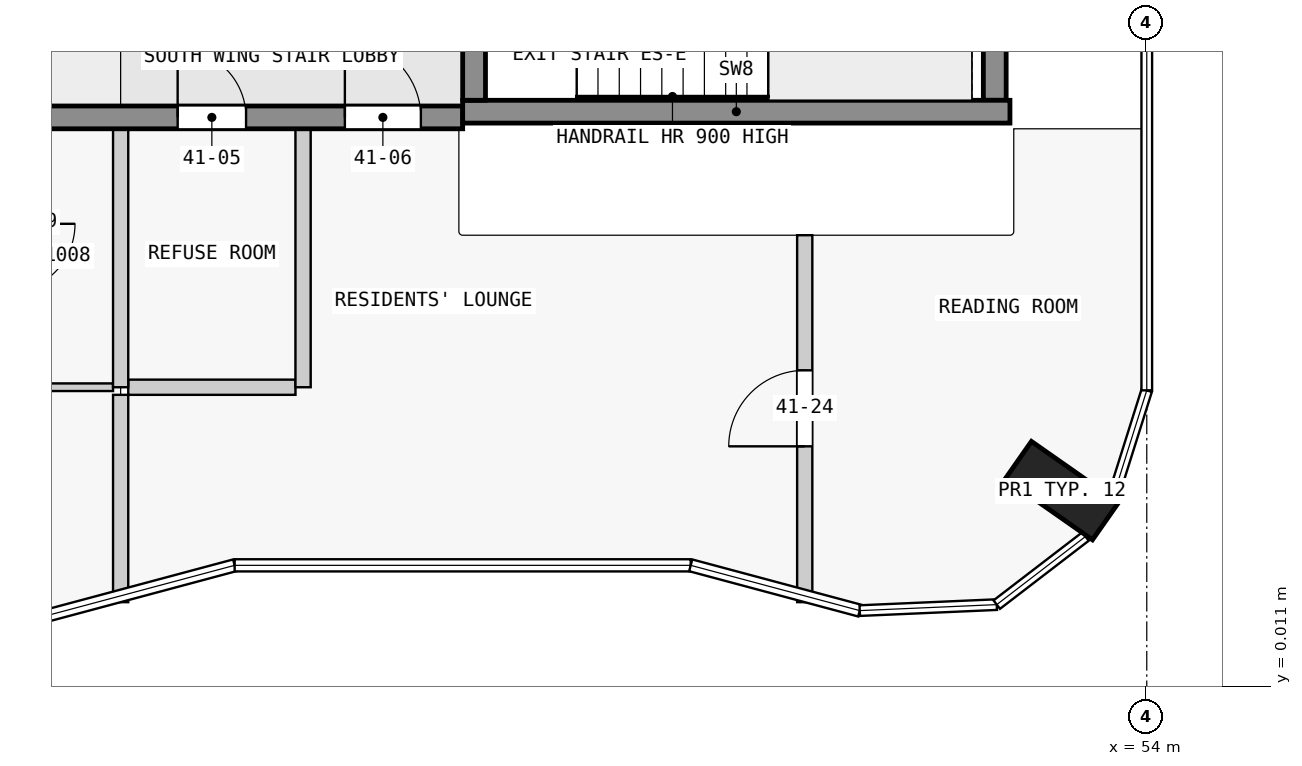
"""IFC4 building model, lengths in metres.
Left out: names, types, materials, properties, quantities, classifications, styles, units other than length and angle.
Written with IfcOpenShell. Run it as: python <this file> out.ifc"""

import sys

from ifc_helpers import new_model, si_unit, direction, frame, frame_2d, origin, origin_2d, place, context, subcontext, project, spatial, rectangle, extrude, element, fill, save


model = new_model("IFC4")
c1 = context("Model", 3, precision=1e-05, world=origin(), true_north=direction((0.0, 1.0)))
c2 = subcontext(c1, "Body", "Model", "MODEL_VIEW")
j1 = project(units=[si_unit("LENGTHUNIT", "METRE"), si_unit("PLANEANGLEUNIT", "RADIAN")], contexts=[c1])
p1 = place(None, origin())
s1 = spatial("IfcSite", under=j1, at=p1, CompositionType="ELEMENT")
p2 = place(p1, origin())
s2 = spatial("IfcBuilding", under=s1, at=p2, CompositionType="ELEMENT")
p3 = place(p2, frame((0.0, 0.0, 160.4)))
s3 = spatial("IfcBuildingStorey", under=s2, at=p3, CompositionType="ELEMENT", Elevation=160.4)
p4 = place(p3, frame((52.884, 2.59, 0.0), z_axis=(0.0, 0.0, 1.0), x_axis=(0.573542637991, 0.819175709117, 0.0)))
e1 = element("IfcColumn", 1, at=p4, inside=s3, PredefinedType="COLUMN", context=c2, shape_type="SweptSolid", body=[
    extrude(rectangle(XDim=0.6, YDim=1.4, at=origin_2d()), origin(), (0.0, 0.0, 1.0), 3.5),
])
p5 = place(p3, frame((45.15, 7.725, 0.0), z_axis=(0.0, 0.0, 1.0), x_axis=(0.0, 1.0, 0.0)))
e2 = element("IfcWall", 2, at=p5, inside=s3, PredefinedType="SHEAR", context=c2, shape_type="SweptSolid", body=[
    extrude(rectangle(XDim=2.55, YDim=0.3, at=frame_2d((1.275, 0.0))), origin(), (0.0, 0.0, 1.0), 3.5),
])
p6 = place(p5, frame((0.725, 0.0, 0.0)))
e3 = element("IfcOpeningElement", 3, at=p6, cuts=e2, PredefinedType="OPENING", context=c2, shape_type="SweptSolid", body=[
    extrude(rectangle(XDim=1.1, YDim=2.1, at=frame_2d((0.55, 1.05))), frame((0.0, 0.16, 0.0), z_axis=(0.0, -1.0, 0.0), x_axis=(1.0, 0.0, 0.0)), (0.0, 0.0, 1.0), 0.32),
])
p7 = place(p3, frame((52.0, 7.725, 0.0), z_axis=(0.0, 0.0, 1.0), x_axis=(0.0, 1.0, 0.0)))
e4 = element("IfcWall", 4, at=p7, inside=s3, PredefinedType="SHEAR", context=c2, shape_type="SweptSolid", body=[
    extrude(rectangle(XDim=2.55, YDim=0.3, at=frame_2d((1.275, 0.0))), origin(), (0.0, 0.0, 1.0), 3.5),
])
p8 = place(p3, frame((45.0, 7.575, 0.0), z_axis=(0.0, 0.0, 1.0), x_axis=(1.0, 0.0, 0.0)))
e5 = element("IfcWall", 5, at=p8, inside=s3, PredefinedType="SHEAR", context=c2, shape_type="SweptSolid", body=[
    extrude(rectangle(XDim=7.2, YDim=0.3, at=frame_2d((3.6, 0.0))), origin(), (0.0, 0.0, 1.0), 3.5),
])
p9 = place(p3, frame((22.5, 7.5, 0.0), z_axis=(0.0, 0.0, 1.0), x_axis=(1.0, 0.0, 0.0)))
e6 = element("IfcWall", 6, at=p9, inside=s3, PredefinedType="SHEAR", context=c2, shape_type="SweptSolid", body=[
    extrude(rectangle(XDim=22.5, YDim=0.3, at=frame_2d((11.25, 0.0))), origin(), (0.0, 0.0, 1.0), 3.25),
])
p10 = place(p9, frame((1.75, 0.0, 0.0)))
e7 = element("IfcOpeningElement", 7, at=p10, cuts=e6, PredefinedType="OPENING", context=c2, shape_type="SweptSolid", body=[
    extrude(rectangle(XDim=1.0, YDim=2.1, at=frame_2d((0.5, 1.05))), frame((0.0, 0.16, 0.0), z_axis=(0.0, -1.0, 0.0), x_axis=(1.0, 0.0, 0.0)), (0.0, 0.0, 1.0), 0.32),
])
p11 = place(p9, frame((6.25, 0.0, 0.0)))
e8 = element("IfcOpeningElement", 8, at=p11, cuts=e6, PredefinedType="OPENING", context=c2, shape_type="SweptSolid", body=[
    extrude(rectangle(XDim=1.0, YDim=2.1, at=frame_2d((0.5, 1.05))), frame((0.0, 0.16, 0.0), z_axis=(0.0, -1.0, 0.0), x_axis=(1.0, 0.0, 0.0)), (0.0, 0.0, 1.0), 0.32),
])
p12 = place(p9, frame((10.75, 0.0, 0.0)))
e9 = element("IfcOpeningElement", 9, at=p12, cuts=e6, PredefinedType="OPENING", context=c2, shape_type="SweptSolid", body=[
    extrude(rectangle(XDim=1.0, YDim=2.1, at=frame_2d((0.5, 1.05))), frame((0.0, 0.16, 0.0), z_axis=(0.0, -1.0, 0.0), x_axis=(1.0, 0.0, 0.0)), (0.0, 0.0, 1.0), 0.32),
])
p13 = place(p9, frame((15.25, 0.0, 0.0)))
e10 = element("IfcOpeningElement", 10, at=p13, cuts=e6, PredefinedType="OPENING", context=c2, shape_type="SweptSolid", body=[
    extrude(rectangle(XDim=1.0, YDim=2.1, at=frame_2d((0.5, 1.05))), frame((0.0, 0.16, 0.0), z_axis=(0.0, -1.0, 0.0), x_axis=(1.0, 0.0, 0.0)), (0.0, 0.0, 1.0), 0.32),
])
p14 = place(p9, frame((18.75, 0.0, 0.0)))
e11 = element("IfcOpeningElement", 11, at=p14, cuts=e6, PredefinedType="OPENING", context=c2, shape_type="SweptSolid", body=[
    extrude(rectangle(XDim=0.9, YDim=2.1, at=frame_2d((0.45, 1.05))), frame((0.0, 0.16, 0.0), z_axis=(0.0, -1.0, 0.0), x_axis=(1.0, 0.0, 0.0)), (0.0, 0.0, 1.0), 0.32),
])
p15 = place(p9, frame((20.95, 0.0, 0.0)))
e12 = element("IfcOpeningElement", 12, at=p15, cuts=e6, PredefinedType="OPENING", context=c2, shape_type="SweptSolid", body=[
    extrude(rectangle(XDim=1.0, YDim=2.1, at=frame_2d((0.5, 1.05))), frame((0.0, 0.16, 0.0), z_axis=(0.0, -1.0, 0.0), x_axis=(1.0, 0.0, 0.0)), (0.0, 0.0, 1.0), 0.32),
])
p16 = place(p3, frame((39.05, 3.95, 0.0), z_axis=(0.0, 0.0, 1.0), x_axis=(1.0, 0.0, 0.0)))
e13 = element("IfcWall", 13, at=p16, inside=s3, PredefinedType="PARTITIONING", context=c2, shape_type="SweptSolid", body=[
    extrude(rectangle(XDim=1.35, YDim=0.1, at=frame_2d((0.675, 0.0))), origin(), (0.0, 0.0, 1.0), 3.25),
])
p17 = place(p3, frame((40.6, 3.95, 0.0), z_axis=(0.0, 0.0, 1.0), x_axis=(1.0, 0.0, 0.0)))
e14 = element("IfcWall", 14, at=p17, inside=s3, PredefinedType="PARTITIONING", context=c2, shape_type="SweptSolid", body=[
    extrude(rectangle(XDim=2.2, YDim=0.2, at=frame_2d((1.1, 0.0))), origin(), (0.0, 0.0, 1.0), 3.25),
])
p18 = place(p3, frame((40.5, 3.85, 0.0), z_axis=(0.0, 0.0, 1.0), x_axis=(0.0, -1.0, 0.0)))
e15 = element("IfcWall", 15, at=p18, inside=s3, PredefinedType="PARTITIONING", context=c2, shape_type="SweptSolid", body=[
    extrude(rectangle(XDim=2.728, YDim=0.2, at=frame_2d((1.364, 0.0))), origin(), (0.0, 0.0, 1.0), 3.25),
])
for number, where, z_axis, x_axis in (
    (16, (40.5, 3.95, 0.0), (0.0, 0.0, 1.0), (0.0, 1.0, 0.0)),
    (17, (42.9, 3.95, 0.0), (0.0, 0.0, 1.0), (0.0, 1.0, 0.0)),
):
    element("IfcWall", number, at=place(p3, frame(where, z_axis=z_axis, x_axis=x_axis)), inside=s3, PredefinedType="PARTITIONING", context=c2, shape_type="SweptSolid", body=[
        extrude(rectangle(XDim=3.4, YDim=0.2, at=frame_2d((1.7, 0.0))), origin(), (0.0, 0.0, 1.0), 3.25),
    ])
p19 = place(p3, frame((49.5, 1.122, 0.0), z_axis=(0.0, 0.0, 1.0), x_axis=(0.0, 1.0, 0.0)))
e18 = element("IfcWall", 18, at=p19, inside=s3, PredefinedType="PARTITIONING", context=c2, shape_type="SweptSolid", body=[
    extrude(rectangle(XDim=4.828, YDim=0.2, at=frame_2d((2.414, 0.0))), origin(), (0.0, 0.0, 1.0), 3.25),
])
p20 = place(p19, frame((2.05, 0.0, 0.0)))
e19 = element("IfcOpeningElement", 19, at=p20, cuts=e18, PredefinedType="OPENING", context=c2, shape_type="SweptSolid", body=[
    extrude(rectangle(XDim=1.0, YDim=2.1, at=frame_2d((0.5, 1.05))), frame((0.0, 0.11, 0.0), z_axis=(0.0, -1.0, 0.0), x_axis=(1.0, 0.0, 0.0)), (0.0, 0.0, 1.0), 0.22),
])
p21 = place(p14, origin())
e20 = element("IfcDoor", 20, at=p21, inside=s3, OperationType="SINGLE_SWING_RIGHT", PredefinedType="DOOR", context=c2, shape_type="SweptSolid", body=[
    extrude(rectangle(XDim=0.9, YDim=2.1, at=frame_2d((0.45, 1.05))), frame((0.0, 0.025, 0.0), z_axis=(0.0, -1.0, 0.0), x_axis=(1.0, 0.0, 0.0)), (0.0, 0.0, 1.0), 0.05),
])
fill(e11, e20)
p22 = place(p15, origin())
e21 = element("IfcDoor", 21, at=p22, inside=s3, OperationType="SINGLE_SWING_RIGHT", PredefinedType="DOOR", context=c2, shape_type="SweptSolid", body=[
    extrude(rectangle(XDim=1.0, YDim=2.1, at=frame_2d((0.5, 1.05))), frame((0.0, 0.025, 0.0), z_axis=(0.0, -1.0, 0.0), x_axis=(1.0, 0.0, 0.0)), (0.0, 0.0, 1.0), 0.05),
])
fill(e12, e21)
p23 = place(p20, origin())
e22 = element("IfcDoor", 22, at=p23, inside=s3, OperationType="SINGLE_SWING_RIGHT", PredefinedType="DOOR", context=c2, shape_type="SweptSolid", body=[
    extrude(rectangle(XDim=1.0, YDim=2.1, at=frame_2d((0.5, 1.05))), frame((0.0, 0.025, 0.0), z_axis=(0.0, -1.0, 0.0), x_axis=(1.0, 0.0, 0.0)), (0.0, 0.0, 1.0), 0.05),
])
fill(e19, e22)
save(model, sys.argv[1])
